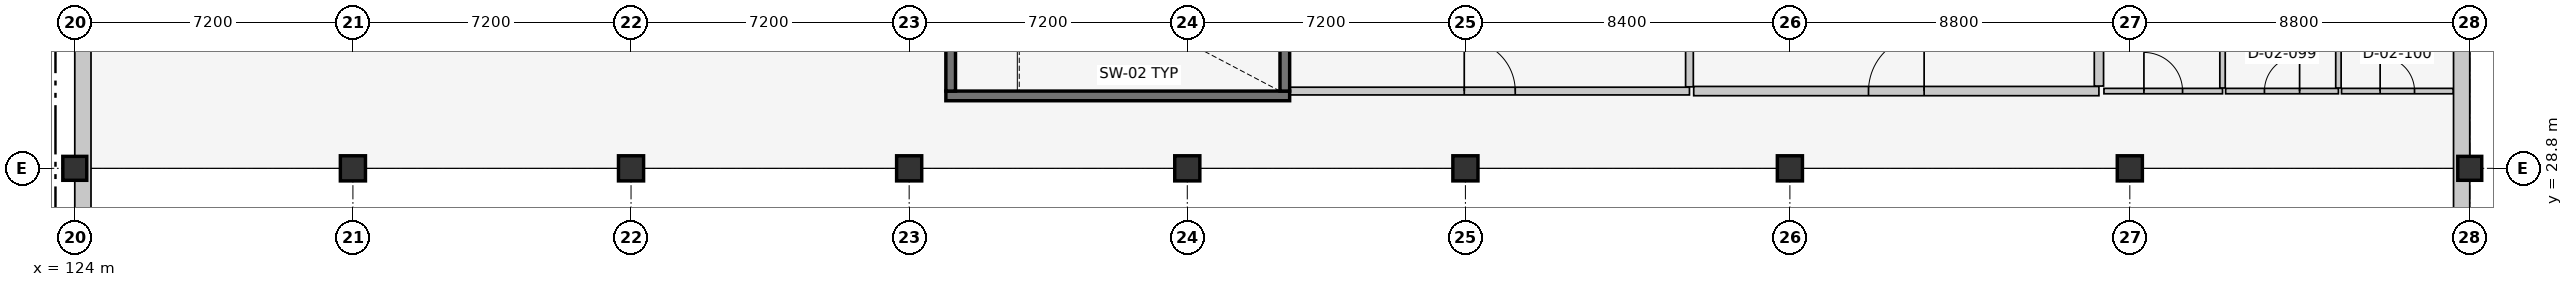
"""IFC4 building model, lengths in metres.
Left out: names, types, materials, properties, quantities, classifications, styles, units other than length and angle.
Written with IfcOpenShell. Run it as: python <this file> out.ifc"""

import sys

from ifc_helpers import new_model, si_unit, direction, frame, frame_2d, origin, origin_2d, place, context, subcontext, project, spatial, rectangle, extrude, element, fill, save


model = new_model("IFC4")
c1 = context("Model", 3, precision=1e-05, world=origin(), true_north=direction((0.0, 1.0)))
c2 = subcontext(c1, "Body", "Model", "MODEL_VIEW")
j1 = project(units=[si_unit("LENGTHUNIT", "METRE"), si_unit("PLANEANGLEUNIT", "RADIAN")], contexts=[c1])
p1 = place(None, origin())
s1 = spatial("IfcSite", under=j1, at=p1, CompositionType="ELEMENT")
p2 = place(p1, origin())
s2 = spatial("IfcBuilding", under=s1, at=p2, CompositionType="ELEMENT")
p3 = place(p2, frame((0.0, 0.0, 9.6)))
s3 = spatial("IfcBuildingStorey", under=s2, at=p3, CompositionType="ELEMENT", Elevation=9.6)
p4 = place(p3, frame((124.0, 28.8, 0.0), z_axis=(0.0, 0.0, 1.0), x_axis=(1.0, 0.0, 0.0)))
e1 = element("IfcColumn", 1, at=p4, inside=s3, PredefinedType="COLUMN", context=c2, shape_type="SweptSolid", body=[
    extrude(rectangle(XDim=0.62, YDim=0.62, at=origin_2d()), origin(), (0.0, 0.0, 1.0), 4.2),
])
for number, where, z_axis, x_axis in (
    (2, (131.2, 28.8, 0.0), (0.0, 0.0, 1.0), (1.0, 0.0, 0.0)),
    (3, (138.4, 28.8, 0.0), (0.0, 0.0, 1.0), (1.0, 0.0, 0.0)),
    (4, (145.6, 28.8, 0.0), (0.0, 0.0, 1.0), (1.0, 0.0, 0.0)),
    (5, (152.8, 28.8, 0.0), (0.0, 0.0, 1.0), (1.0, 0.0, 0.0)),
    (6, (160.0, 28.8, 0.0), (0.0, 0.0, 1.0), (1.0, 0.0, 0.0)),
    (7, (168.4, 28.8, 0.0), (0.0, 0.0, 1.0), (1.0, 0.0, 0.0)),
    (8, (177.2, 28.8, 0.0), (0.0, 0.0, 1.0), (1.0, 0.0, 0.0)),
):
    element("IfcColumn", number, at=place(p3, frame(where, z_axis=z_axis, x_axis=x_axis)), inside=s3, PredefinedType="COLUMN", context=c2, shape_type="SweptSolid", body=[
        extrude(rectangle(XDim=0.65, YDim=0.65, at=origin_2d()), origin(), (0.0, 0.0, 1.0), 4.2),
    ])
p5 = place(p3, frame((186.0, 28.8, 0.0), z_axis=(0.0, 0.0, 1.0), x_axis=(1.0, 0.0, 0.0)))
e9 = element("IfcColumn", 9, at=p5, inside=s3, PredefinedType="COLUMN", context=c2, shape_type="SweptSolid", body=[
    extrude(rectangle(XDim=0.62, YDim=0.62, at=origin_2d()), origin(), (0.0, 0.0, 1.0), 4.2),
])
p6 = place(p3, frame((185.79, 38.4, 0.0), z_axis=(0.0, 0.0, 1.0), x_axis=(0.0, -1.0, 0.0)))
e10 = element("IfcWall", 10, at=p6, inside=s3, PredefinedType="SOLIDWALL", context=c2, shape_type="SweptSolid", body=[
    extrude(rectangle(XDim=38.4, YDim=0.42, at=frame_2d((19.2, 0.0))), origin(), (0.0, 0.0, 1.0), 3.825),
])
p7 = place(p6, frame((1.195, 0.0, 0.9)))
e11 = element("IfcOpeningElement", 11, at=p7, cuts=e10, PredefinedType="OPENING", context=c2, shape_type="SweptSolid", body=[
    extrude(rectangle(XDim=1.45, YDim=1.45, at=frame_2d((0.725, 0.725))), frame((0.0, 0.222, 0.0), z_axis=(0.0, -1.0, 0.0), x_axis=(1.0, 0.0, 0.0)), (0.0, 0.0, 1.0), 0.444),
])
p8 = place(p6, frame((5.31, 0.0, 0.9)))
e12 = element("IfcOpeningElement", 12, at=p8, cuts=e10, PredefinedType="OPENING", context=c2, shape_type="SweptSolid", body=[
    extrude(rectangle(XDim=0.9, YDim=1.6, at=frame_2d((0.45, 0.8))), frame((0.0, 0.222, 0.0), z_axis=(0.0, -1.0, 0.0), x_axis=(1.0, 0.0, 0.0)), (0.0, 0.0, 1.0), 0.444),
])
p9 = place(p3, frame((124.21, 0.0, 0.0), z_axis=(0.0, 0.0, 1.0), x_axis=(0.0, 1.0, 0.0)))
e13 = element("IfcWall", 13, at=p9, inside=s3, PredefinedType="SOLIDWALL", context=c2, shape_type="SweptSolid", body=[
    extrude(rectangle(XDim=38.4, YDim=0.42, at=frame_2d((19.2, 0.0))), origin(), (0.0, 0.0, 1.0), 3.825),
])
p10 = place(p9, frame((32.165, 0.0, 0.9)))
e14 = element("IfcOpeningElement", 14, at=p10, cuts=e13, PredefinedType="OPENING", context=c2, shape_type="SweptSolid", body=[
    extrude(rectangle(XDim=0.95, YDim=1.45, at=frame_2d((0.475, 0.725))), frame((0.0, 0.222, 0.0), z_axis=(0.0, -1.0, 0.0), x_axis=(1.0, 0.0, 0.0)), (0.0, 0.0, 1.0), 0.444),
])
p11 = place(p9, frame((35.955, 0.0, 0.9)))
e15 = element("IfcOpeningElement", 15, at=p11, cuts=e13, PredefinedType="OPENING", context=c2, shape_type="SweptSolid", body=[
    extrude(rectangle(XDim=1.05, YDim=1.45, at=frame_2d((0.525, 0.725))), frame((0.0, 0.222, 0.0), z_axis=(0.0, -1.0, 0.0), x_axis=(1.0, 0.0, 0.0)), (0.0, 0.0, 1.0), 0.444),
])
p12 = place(p3, frame((146.55, 30.675, 0.0), z_axis=(0.0, 0.0, 1.0), x_axis=(1.0, 0.0, 0.0)))
e16 = element("IfcWall", 16, at=p12, inside=s3, PredefinedType="SHEAR", context=c2, shape_type="SweptSolid", body=[
    extrude(rectangle(XDim=8.9, YDim=0.25, at=frame_2d((4.45, 0.0))), origin(), (0.0, 0.0, 1.0), 3.95),
])
p13 = place(p3, frame((146.675, 34.35, 0.0), z_axis=(0.0, 0.0, 1.0), x_axis=(0.0, -1.0, 0.0)))
e17 = element("IfcWall", 17, at=p13, inside=s3, PredefinedType="SHEAR", context=c2, shape_type="SweptSolid", body=[
    extrude(rectangle(XDim=3.55, YDim=0.25, at=frame_2d((1.775, 0.0))), origin(), (0.0, 0.0, 1.0), 3.95),
])
p14 = place(p13, frame((1.2, 0.0, 0.0)))
e18 = element("IfcOpeningElement", 18, at=p14, cuts=e17, PredefinedType="OPENING", context=c2, shape_type="SweptSolid", body=[
    extrude(rectangle(XDim=1.15, YDim=2.15, at=frame_2d((0.575, 1.075))), frame((0.0, 0.137, 0.0), z_axis=(0.0, -1.0, 0.0), x_axis=(1.0, 0.0, 0.0)), (0.0, 0.0, 1.0), 0.274),
])
p15 = place(p3, frame((155.325, 30.8, 0.0), z_axis=(0.0, 0.0, 1.0), x_axis=(0.0, 1.0, 0.0)))
e19 = element("IfcWall", 19, at=p15, inside=s3, PredefinedType="SHEAR", context=c2, shape_type="SweptSolid", body=[
    extrude(rectangle(XDim=3.55, YDim=0.25, at=frame_2d((1.775, 0.0))), origin(), (0.0, 0.0, 1.0), 3.95),
])
p16 = place(p3, frame((155.46, 30.8, 0.0), z_axis=(0.0, 0.0, 1.0), x_axis=(1.0, 0.0, 0.0)))
e20 = element("IfcWall", 20, at=p16, inside=s3, PredefinedType="PARTITIONING", context=c2, shape_type="SweptSolid", body=[
    extrude(rectangle(XDim=10.34, YDim=0.2, at=frame_2d((5.17, 0.0))), origin(), (0.0, 0.0, 1.0), 3.95),
])
p17 = place(p16, frame((4.51, 0.0, 0.0)))
e21 = element("IfcOpeningElement", 21, at=p17, cuts=e20, PredefinedType="OPENING", context=c2, shape_type="SweptSolid", body=[
    extrude(rectangle(XDim=1.32, YDim=2.15, at=frame_2d((0.66, 1.075))), frame((0.0, 0.112, 0.0), z_axis=(0.0, -1.0, 0.0), x_axis=(1.0, 0.0, 0.0)), (0.0, 0.0, 1.0), 0.224),
])
p18 = place(p3, frame((165.8, 30.91, 0.0), z_axis=(0.0, 0.0, 1.0), x_axis=(0.0, 1.0, 0.0)))
e22 = element("IfcWall", 22, at=p18, inside=s3, PredefinedType="PARTITIONING", context=c2, shape_type="SweptSolid", body=[
    extrude(rectangle(XDim=7.06, YDim=0.2, at=frame_2d((3.53, 0.0))), origin(), (0.0, 0.0, 1.0), 3.95),
])
p19 = place(p3, frame((165.91, 30.8, 0.0), z_axis=(0.0, 0.0, 1.0), x_axis=(1.0, 0.0, 0.0)))
e23 = element("IfcWall", 23, at=p19, inside=s3, PredefinedType="PARTITIONING", context=c2, shape_type="SweptSolid", body=[
    extrude(rectangle(XDim=10.49, YDim=0.24, at=frame_2d((5.245, 0.0))), origin(), (0.0, 0.0, 1.0), 3.95),
])
p20 = place(p19, frame((4.525, 0.0, 0.0)))
e24 = element("IfcOpeningElement", 24, at=p20, cuts=e23, PredefinedType="OPENING", context=c2, shape_type="SweptSolid", body=[
    extrude(rectangle(XDim=1.44, YDim=2.2, at=frame_2d((0.72, 1.1))), frame((0.0, 0.132, 0.0), z_axis=(0.0, -1.0, 0.0), x_axis=(1.0, 0.0, 0.0)), (0.0, 0.0, 1.0), 0.264),
])
p21 = place(p3, frame((176.4, 30.93, 0.0), z_axis=(0.0, 0.0, 1.0), x_axis=(0.0, 1.0, 0.0)))
e25 = element("IfcWall", 25, at=p21, inside=s3, PredefinedType="PARTITIONING", context=c2, shape_type="SweptSolid", body=[
    extrude(rectangle(XDim=7.04, YDim=0.24, at=frame_2d((3.52, 0.0))), origin(), (0.0, 0.0, 1.0), 3.95),
])
p22 = place(p3, frame((176.53, 30.8, 0.0), z_axis=(0.0, 0.0, 1.0), x_axis=(1.0, 0.0, 0.0)))
e26 = element("IfcWall", 26, at=p22, inside=s3, PredefinedType="PARTITIONING", context=c2, shape_type="SweptSolid", body=[
    extrude(rectangle(XDim=3.07, YDim=0.14, at=frame_2d((1.535, 0.0))), origin(), (0.0, 0.0, 1.0), 3.95),
])
p23 = place(p22, frame((1.035, 0.0, 0.0)))
e27 = element("IfcOpeningElement", 27, at=p23, cuts=e26, PredefinedType="OPENING", context=c2, shape_type="SweptSolid", body=[
    extrude(rectangle(XDim=1.0, YDim=2.1, at=frame_2d((0.5, 1.05))), frame((0.0, 0.082, 0.0), z_axis=(0.0, -1.0, 0.0), x_axis=(1.0, 0.0, 0.0)), (0.0, 0.0, 1.0), 0.164),
])
p24 = place(p3, frame((179.6, 30.88, 0.0), z_axis=(0.0, 0.0, 1.0), x_axis=(0.0, 1.0, 0.0)))
e28 = element("IfcWall", 28, at=p24, inside=s3, PredefinedType="PARTITIONING", context=c2, shape_type="SweptSolid", body=[
    extrude(rectangle(XDim=7.09, YDim=0.14, at=frame_2d((3.545, 0.0))), origin(), (0.0, 0.0, 1.0), 3.95),
])
p25 = place(p3, frame((179.68, 30.8, 0.0), z_axis=(0.0, 0.0, 1.0), x_axis=(1.0, 0.0, 0.0)))
e29 = element("IfcWall", 29, at=p25, inside=s3, PredefinedType="PARTITIONING", context=c2, shape_type="SweptSolid", body=[
    extrude(rectangle(XDim=2.92, YDim=0.14, at=frame_2d((1.46, 0.0))), origin(), (0.0, 0.0, 1.0), 3.95),
])
p26 = place(p25, frame((1.005, 0.0, 0.0)))
e30 = element("IfcOpeningElement", 30, at=p26, cuts=e29, PredefinedType="OPENING", context=c2, shape_type="SweptSolid", body=[
    extrude(rectangle(XDim=0.91, YDim=2.06, at=frame_2d((0.455, 1.03))), frame((0.0, 0.082, 0.0), z_axis=(0.0, -1.0, 0.0), x_axis=(1.0, 0.0, 0.0)), (0.0, 0.0, 1.0), 0.164),
])
p27 = place(p3, frame((182.6, 30.88, 0.0), z_axis=(0.0, 0.0, 1.0), x_axis=(0.0, 1.0, 0.0)))
e31 = element("IfcWall", 31, at=p27, inside=s3, PredefinedType="PARTITIONING", context=c2, shape_type="SweptSolid", body=[
    extrude(rectangle(XDim=7.09, YDim=0.14, at=frame_2d((3.545, 0.0))), origin(), (0.0, 0.0, 1.0), 3.95),
])
p28 = place(p3, frame((182.68, 30.8, 0.0), z_axis=(0.0, 0.0, 1.0), x_axis=(1.0, 0.0, 0.0)))
e32 = element("IfcWall", 32, at=p28, inside=s3, PredefinedType="PARTITIONING", context=c2, shape_type="SweptSolid", body=[
    extrude(rectangle(XDim=2.89, YDim=0.14, at=frame_2d((1.445, 0.0))), origin(), (0.0, 0.0, 1.0), 3.95),
])
p29 = place(p28, frame((1.0, 0.0, 0.0)))
e33 = element("IfcOpeningElement", 33, at=p29, cuts=e32, PredefinedType="OPENING", context=c2, shape_type="SweptSolid", body=[
    extrude(rectangle(XDim=0.89, YDim=2.05, at=frame_2d((0.445, 1.025))), frame((0.0, 0.082, 0.0), z_axis=(0.0, -1.0, 0.0), x_axis=(1.0, 0.0, 0.0)), (0.0, 0.0, 1.0), 0.164),
])
p30 = place(p17, origin())
e34 = element("IfcDoor", 34, at=p30, inside=s3, OperationType="SINGLE_SWING_LEFT", PredefinedType="DOOR", context=c2, shape_type="SweptSolid", body=[
    extrude(rectangle(XDim=1.32, YDim=2.15, at=frame_2d((0.66, 1.075))), frame((0.0, 0.025, 0.0), z_axis=(0.0, -1.0, 0.0), x_axis=(1.0, 0.0, 0.0)), (0.0, 0.0, 1.0), 0.05),
])
fill(e21, e34)
p31 = place(p20, origin())
e35 = element("IfcDoor", 35, at=p31, inside=s3, OperationType="SINGLE_SWING_RIGHT", PredefinedType="DOOR", context=c2, shape_type="SweptSolid", body=[
    extrude(rectangle(XDim=1.44, YDim=2.2, at=frame_2d((0.72, 1.1))), frame((0.0, 0.025, 0.0), z_axis=(0.0, -1.0, 0.0), x_axis=(1.0, 0.0, 0.0)), (0.0, 0.0, 1.0), 0.05),
])
fill(e24, e35)
p32 = place(p23, origin())
e36 = element("IfcDoor", 36, at=p32, inside=s3, OperationType="SINGLE_SWING_LEFT", PredefinedType="DOOR", context=c2, shape_type="SweptSolid", body=[
    extrude(rectangle(XDim=1.0, YDim=2.1, at=frame_2d((0.5, 1.05))), frame((0.0, 0.025, 0.0), z_axis=(0.0, -1.0, 0.0), x_axis=(1.0, 0.0, 0.0)), (0.0, 0.0, 1.0), 0.05),
])
fill(e27, e36)
p33 = place(p26, origin())
e37 = element("IfcDoor", 37, at=p33, inside=s3, OperationType="SINGLE_SWING_RIGHT", PredefinedType="DOOR", context=c2, shape_type="SweptSolid", body=[
    extrude(rectangle(XDim=0.91, YDim=2.06, at=frame_2d((0.455, 1.03))), frame((0.0, 0.025, 0.0), z_axis=(0.0, -1.0, 0.0), x_axis=(1.0, 0.0, 0.0)), (0.0, 0.0, 1.0), 0.05),
])
fill(e30, e37)
p34 = place(p29, origin())
e38 = element("IfcDoor", 38, at=p34, inside=s3, OperationType="SINGLE_SWING_LEFT", PredefinedType="DOOR", context=c2, shape_type="SweptSolid", body=[
    extrude(rectangle(XDim=0.89, YDim=2.05, at=frame_2d((0.445, 1.025))), frame((0.0, 0.025, 0.0), z_axis=(0.0, -1.0, 0.0), x_axis=(1.0, 0.0, 0.0)), (0.0, 0.0, 1.0), 0.05),
])
fill(e33, e38)
save(model, sys.argv[1])
